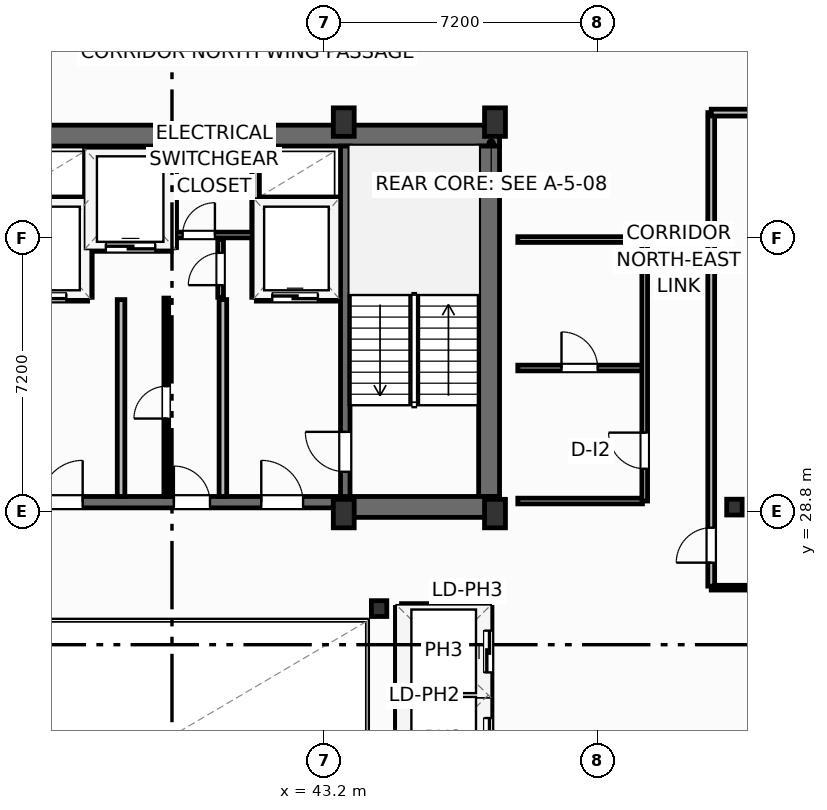
"""IFC4 building model, lengths in metres.
Left out: names, types, materials, properties, quantities, classifications, styles, units other than length and angle.
Written with IfcOpenShell. Run it as: python <this file> out.ifc"""

import sys

from ifc_helpers import new_model, si_unit, direction, frame, frame_2d, origin, origin_2d, place, context, subcontext, project, spatial, rectangle, i_section, extrude, element, fill, save


model = new_model("IFC4")
c1 = context("Model", 3, precision=1e-05, world=origin(), true_north=direction((0.0, 1.0)))
c2 = subcontext(c1, "Body", "Model", "MODEL_VIEW")
j1 = project(units=[si_unit("LENGTHUNIT", "METRE"), si_unit("PLANEANGLEUNIT", "RADIAN")], contexts=[c1])
p1 = place(None, origin())
s1 = spatial("IfcSite", under=j1, at=p1, CompositionType="ELEMENT")
p2 = place(p1, origin())
s2 = spatial("IfcBuilding", under=s1, at=p2, CompositionType="ELEMENT")
p3 = place(p2, frame((0.0, 0.0, 273.0)))
s3 = spatial("IfcBuildingStorey", under=s2, at=p3, CompositionType="ELEMENT", Elevation=273.0)
for number, where, z_axis, x_axis in (
    (1, (43.72, 28.75, 0.0), (0.0, 0.0, 1.0), (1.0, 0.0, 0.0)),
    (2, (47.7, 28.75, 0.0), (0.0, 0.0, 1.0), (1.0, 0.0, 0.0)),
    (3, (43.72, 39.05, 0.0), (0.0, 0.0, 1.0), (1.0, 0.0, 0.0)),
    (4, (47.7, 39.05, 0.0), (0.0, 0.0, 1.0), (1.0, 0.0, 0.0)),
):
    element("IfcColumn", number, at=place(p3, frame(where, z_axis=z_axis, x_axis=x_axis)), inside=s3, PredefinedType="COLUMN", context=c2, shape_type="SweptSolid", body=[
        extrude(rectangle(XDim=0.55, YDim=0.75, at=origin_2d()), origin(), (0.0, 0.0, 1.0), 3.7),
    ])
for number, where, z_axis, x_axis in (
    (5, (44.65, 26.25, 0.0), (0.0, 0.0, 1.0), (1.0, 0.0, 0.0)),
    (6, (54.0, 28.92, 0.0), (0.0, 0.0, 1.0), (1.0, 0.0, 0.0)),
):
    element("IfcColumn", number, at=place(p3, frame(where, z_axis=z_axis, x_axis=x_axis)), inside=s3, PredefinedType="COLUMN", context=c2, shape_type="SweptSolid", body=[
        extrude(i_section(OverallWidth=0.406, OverallDepth=0.416, WebThickness=0.03, FlangeThickness=0.048, FilletRadius=0.025, at=origin_2d()), origin(), (0.0, 0.0, 1.0), 3.7),
    ])
p4 = place(p3, frame((30.58, 38.695, 0.0), z_axis=(0.0, 0.0, 1.0), x_axis=(1.0, 0.0, 0.0)))
e7 = element("IfcWall", 7, at=p4, inside=s3, PredefinedType="SHEAR", context=c2, shape_type="SweptSolid", body=[
    extrude(rectangle(XDim=17.24, YDim=0.55, at=frame_2d((8.62, 0.0))), origin(), (0.0, 0.0, 1.0), 3.45),
])
p5 = place(p3, frame((47.545, 29.2, 0.0), z_axis=(0.0, 0.0, 1.0), x_axis=(0.0, 1.0, 0.0)))
e8 = element("IfcWall", 8, at=p5, inside=s3, PredefinedType="SHEAR", context=c2, shape_type="SweptSolid", body=[
    extrude(rectangle(XDim=9.22, YDim=0.55, at=frame_2d((4.61, 0.0))), origin(), (0.0, 0.0, 1.0), 3.45),
])
p6 = place(p3, frame((43.6, 28.925, 0.0), z_axis=(0.0, 0.0, 1.0), x_axis=(1.0, 0.0, 0.0)))
e9 = element("IfcWall", 9, at=p6, inside=s3, PredefinedType="SHEAR", context=c2, shape_type="SweptSolid", body=[
    extrude(rectangle(XDim=4.22, YDim=0.55, at=frame_2d((2.11, 0.0))), origin(), (0.0, 0.0, 1.0), 3.45),
])
p7 = place(p3, frame((34.8, 29.05, 0.0), z_axis=(0.0, 0.0, 1.0), x_axis=(1.0, 0.0, 0.0)))
e10 = element("IfcWall", 10, at=p7, inside=s3, PredefinedType="SHEAR", context=c2, shape_type="SweptSolid", body=[
    extrude(rectangle(XDim=8.8, YDim=0.3, at=frame_2d((4.4, 0.0))), origin(), (0.0, 0.0, 1.0), 3.45),
])
p8 = place(p7, frame((0.95, 0.0, 0.0)))
e11 = element("IfcOpeningElement", 11, at=p8, cuts=e10, PredefinedType="OPENING", context=c2, shape_type="SweptSolid", body=[
    extrude(rectangle(XDim=1.1, YDim=2.15, at=frame_2d((0.55, 1.075))), frame((0.0, 0.16, 0.0), z_axis=(0.0, -1.0, 0.0), x_axis=(1.0, 0.0, 0.0)), (0.0, 0.0, 1.0), 0.32),
])
p9 = place(p7, frame((6.75, 0.0, 0.0)))
e12 = element("IfcOpeningElement", 12, at=p9, cuts=e10, PredefinedType="OPENING", context=c2, shape_type="SweptSolid", body=[
    extrude(rectangle(XDim=1.1, YDim=2.15, at=frame_2d((0.55, 1.075))), frame((0.0, 0.16, 0.0), z_axis=(0.0, -1.0, 0.0), x_axis=(1.0, 0.0, 0.0)), (0.0, 0.0, 1.0), 0.32),
])
p10 = place(p7, frame((4.45, 0.0, 0.0)))
e13 = element("IfcOpeningElement", 13, at=p10, cuts=e10, PredefinedType="OPENING", context=c2, shape_type="SweptSolid", body=[
    extrude(rectangle(XDim=0.95, YDim=2.15, at=frame_2d((0.475, 1.075))), frame((0.0, 0.16, 0.0), z_axis=(0.0, -1.0, 0.0), x_axis=(1.0, 0.0, 0.0)), (0.0, 0.0, 1.0), 0.32),
])
p11 = place(p3, frame((43.76, 29.2, 0.0), z_axis=(0.0, 0.0, 1.0), x_axis=(0.0, 1.0, 0.0)))
e14 = element("IfcWall", 14, at=p11, inside=s3, PredefinedType="SHEAR", context=c2, shape_type="SweptSolid", body=[
    extrude(rectangle(XDim=9.22, YDim=0.25, at=frame_2d((4.61, 0.0))), origin(), (0.0, 0.0, 1.0), 3.45),
])
p12 = place(p11, frame((0.65, 0.0, 0.0)))
e15 = element("IfcOpeningElement", 15, at=p12, cuts=e14, PredefinedType="OPENING", context=c2, shape_type="SweptSolid", body=[
    extrude(rectangle(XDim=1.05, YDim=2.15, at=frame_2d((0.525, 1.075))), frame((0.0, 0.135, 0.0), z_axis=(0.0, -1.0, 0.0), x_axis=(1.0, 0.0, 0.0)), (0.0, 0.0, 1.0), 0.27),
])
p13 = place(p3, frame((53.39, 26.8, 0.0), z_axis=(0.0, 0.0, 1.0), x_axis=(1.0, 0.0, 0.0)))
e16 = element("IfcWall", 16, at=p13, inside=s3, PredefinedType="PARTITIONING", context=c2, shape_type="SweptSolid", body=[
    extrude(rectangle(XDim=22.348, YDim=0.125, at=frame_2d((11.174, 0.0))), origin(), (0.0, 0.0, 1.0), 3.45),
])
p14 = place(p3, frame((53.39, 26.84, 0.0), z_axis=(0.0, 0.0, 1.0), x_axis=(0.0, 1.0, 0.0)))
e17 = element("IfcWall", 17, at=p14, inside=s3, PredefinedType="PARTITIONING", context=c2, shape_type="SweptSolid", body=[
    extrude(rectangle(XDim=12.46, YDim=0.18, at=frame_2d((6.23, 0.0))), origin(), (0.0, 0.0, 1.0), 3.45),
])
p15 = place(p14, frame((0.618, 0.0, 0.0)))
e18 = element("IfcOpeningElement", 18, at=p15, cuts=e17, PredefinedType="OPENING", context=c2, shape_type="SweptSolid", body=[
    extrude(rectangle(XDim=0.92, YDim=2.05, at=frame_2d((0.46, 1.025))), frame((0.0, 0.1, 0.0), z_axis=(0.0, -1.0, 0.0), x_axis=(1.0, 0.0, 0.0)), (0.0, 0.0, 1.0), 0.2),
])
p16 = place(p3, frame((53.39, 39.3, 0.0), z_axis=(0.0, 0.0, 1.0), x_axis=(1.0, 0.0, 0.0)))
e19 = element("IfcWall", 19, at=p16, inside=s3, PredefinedType="PARTITIONING", context=c2, shape_type="SweptSolid", body=[
    extrude(rectangle(XDim=16.149, YDim=0.18, at=frame_2d((8.075, 0.0))), origin(), (0.0, 0.0, 1.0), 2.739),
])
for number, where, z_axis, x_axis in (
    (20, (37.86, 29.2, 0.0), (0.0, 0.0, 1.0), (0.0, 1.0, 0.0)),
    (21, (40.54, 29.2, 0.0), (0.0, 0.0, 1.0), (0.0, 1.0, 0.0)),
):
    element("IfcWall", number, at=place(p3, frame(where, z_axis=z_axis, x_axis=x_axis)), inside=s3, PredefinedType="PARTITIONING", context=c2, shape_type="SweptSolid", body=[
        extrude(rectangle(XDim=5.18, YDim=0.2, at=frame_2d((2.59, 0.0))), origin(), (0.0, 0.0, 1.0), 3.45),
    ])
p17 = place(p3, frame((34.8, 34.44, 0.0), z_axis=(0.0, 0.0, 1.0), x_axis=(1.0, 0.0, 0.0)))
e22 = element("IfcWall", 22, at=p17, inside=s3, PredefinedType="PARTITIONING", context=c2, shape_type="SweptSolid", body=[
    extrude(rectangle(XDim=2.18, YDim=0.2, at=frame_2d((1.09, 0.0))), origin(), (0.0, 0.0, 1.0), 3.45),
])
p18 = place(p17, frame((0.42, 0.0, 0.0)))
e23 = element("IfcOpeningElement", 23, at=p18, cuts=e22, PredefinedType="OPENING", context=c2, shape_type="SweptSolid", body=[
    extrude(rectangle(XDim=1.2, YDim=2.2, at=frame_2d((0.6, 1.1))), frame((0.0, 0.11, 0.0), z_axis=(0.0, -1.0, 0.0), x_axis=(1.0, 0.0, 0.0)), (0.0, 0.0, 1.0), 0.22),
])
p19 = place(p3, frame((34.8, 36.98, 0.0), z_axis=(0.0, 0.0, 1.0), x_axis=(1.0, 0.0, 0.0)))
e24 = element("IfcWall", 24, at=p19, inside=s3, PredefinedType="PARTITIONING", context=c2, shape_type="SweptSolid", body=[
    extrude(rectangle(XDim=2.18, YDim=0.2, at=frame_2d((1.09, 0.0))), origin(), (0.0, 0.0, 1.0), 3.45),
])
p20 = place(p3, frame((37.0, 34.44, 0.0), z_axis=(0.0, 0.0, 1.0), x_axis=(0.0, 1.0, 0.0)))
e25 = element("IfcWall", 25, at=p20, inside=s3, PredefinedType="PARTITIONING", context=c2, shape_type="SweptSolid", body=[
    extrude(rectangle(XDim=3.9, YDim=0.2, at=frame_2d((1.95, 0.0))), origin(), (0.0, 0.0, 1.0), 3.45),
])
p21 = place(p3, frame((41.42, 34.44, 0.0), z_axis=(0.0, 0.0, 1.0), x_axis=(1.0, 0.0, 0.0)))
e26 = element("IfcWall", 26, at=p21, inside=s3, PredefinedType="PARTITIONING", context=c2, shape_type="SweptSolid", body=[
    extrude(rectangle(XDim=2.18, YDim=0.2, at=frame_2d((1.09, 0.0))), origin(), (0.0, 0.0, 1.0), 3.45),
])
p22 = place(p21, frame((0.42, 0.0, 0.0)))
e27 = element("IfcOpeningElement", 27, at=p22, cuts=e26, PredefinedType="OPENING", context=c2, shape_type="SweptSolid", body=[
    extrude(rectangle(XDim=1.2, YDim=2.2, at=frame_2d((0.6, 1.1))), frame((0.0, 0.11, 0.0), z_axis=(0.0, -1.0, 0.0), x_axis=(1.0, 0.0, 0.0)), (0.0, 0.0, 1.0), 0.22),
])
p23 = place(p3, frame((41.42, 36.98, 0.0), z_axis=(0.0, 0.0, 1.0), x_axis=(1.0, 0.0, 0.0)))
e28 = element("IfcWall", 28, at=p23, inside=s3, PredefinedType="PARTITIONING", context=c2, shape_type="SweptSolid", body=[
    extrude(rectangle(XDim=2.18, YDim=0.2, at=frame_2d((1.09, 0.0))), origin(), (0.0, 0.0, 1.0), 3.45),
])
p24 = place(p3, frame((41.4, 34.44, 0.0), z_axis=(0.0, 0.0, 1.0), x_axis=(0.0, 1.0, 0.0)))
e29 = element("IfcWall", 29, at=p24, inside=s3, PredefinedType="PARTITIONING", context=c2, shape_type="SweptSolid", body=[
    extrude(rectangle(XDim=3.9, YDim=0.2, at=frame_2d((1.95, 0.0))), origin(), (0.0, 0.0, 1.0), 3.45),
])
p25 = place(p3, frame((37.06, 35.75, 0.0), z_axis=(0.0, 0.0, 1.0), x_axis=(1.0, 0.0, 0.0)))
e30 = element("IfcWall", 30, at=p25, inside=s3, PredefinedType="PARTITIONING", context=c2, shape_type="SweptSolid", body=[
    extrude(rectangle(XDim=2.12, YDim=0.2, at=frame_2d((1.06, 0.0))), origin(), (0.0, 0.0, 1.0), 3.45),
])
p26 = place(p25, frame((0.4, 0.0, 0.0)))
e31 = element("IfcOpeningElement", 31, at=p26, cuts=e30, PredefinedType="OPENING", context=c2, shape_type="SweptSolid", body=[
    extrude(rectangle(XDim=1.3, YDim=2.2, at=frame_2d((0.65, 1.1))), frame((0.0, 0.11, 0.0), z_axis=(0.0, -1.0, 0.0), x_axis=(1.0, 0.0, 0.0)), (0.0, 0.0, 1.0), 0.22),
])
p27 = place(p3, frame((39.22, 35.75, 0.0), z_axis=(0.0, 0.0, 1.0), x_axis=(0.0, 1.0, 0.0)))
e32 = element("IfcWall", 32, at=p27, inside=s3, PredefinedType="PARTITIONING", context=c2, shape_type="SweptSolid", body=[
    extrude(rectangle(XDim=2.59, YDim=0.2, at=frame_2d((1.295, 0.0))), origin(), (0.0, 0.0, 1.0), 3.45),
])
p28 = place(p3, frame((39.3, 36.08, 0.0), z_axis=(0.0, 0.0, 1.0), x_axis=(1.0, 0.0, 0.0)))
e33 = element("IfcWall", 33, at=p28, inside=s3, PredefinedType="PARTITIONING", context=c2, shape_type="SweptSolid", body=[
    extrude(rectangle(XDim=2.02, YDim=0.15, at=frame_2d((1.01, 0.0))), origin(), (0.0, 0.0, 1.0), 3.45),
])
p29 = place(p28, frame((0.18, 0.0, 0.0)))
e34 = element("IfcOpeningElement", 34, at=p29, cuts=e33, PredefinedType="OPENING", context=c2, shape_type="SweptSolid", body=[
    extrude(rectangle(XDim=0.85, YDim=2.05, at=frame_2d((0.425, 1.025))), frame((0.0, 0.085, 0.0), z_axis=(0.0, -1.0, 0.0), x_axis=(1.0, 0.0, 0.0)), (0.0, 0.0, 1.0), 0.17),
])
p30 = place(p3, frame((40.48, 34.44, 0.0), z_axis=(0.0, 0.0, 1.0), x_axis=(0.0, 1.0, 0.0)))
e35 = element("IfcWall", 35, at=p30, inside=s3, PredefinedType="PARTITIONING", context=c2, shape_type="SweptSolid", body=[
    extrude(rectangle(XDim=1.52, YDim=0.15, at=frame_2d((0.76, 0.0))), origin(), (0.0, 0.0, 1.0), 3.45),
])
p31 = place(p30, frame((0.32, 0.0, 0.0)))
e36 = element("IfcOpeningElement", 36, at=p31, cuts=e35, PredefinedType="OPENING", context=c2, shape_type="SweptSolid", body=[
    extrude(rectangle(XDim=0.85, YDim=2.05, at=frame_2d((0.425, 1.025))), frame((0.0, 0.085, 0.0), z_axis=(0.0, -1.0, 0.0), x_axis=(1.0, 0.0, 0.0)), (0.0, 0.0, 1.0), 0.17),
])
p32 = place(p3, frame((39.05, 29.2, 0.0), z_axis=(0.0, 0.0, 1.0), x_axis=(0.0, 1.0, 0.0)))
e37 = element("IfcWall", 37, at=p32, inside=s3, PredefinedType="PARTITIONING", context=c2, shape_type="SweptSolid", body=[
    extrude(rectangle(XDim=5.22, YDim=0.125, at=frame_2d((2.61, 0.0))), origin(), (0.0, 0.0, 1.0), 3.45),
])
p33 = place(p32, frame((2.05, 0.0, 0.0)))
e38 = element("IfcOpeningElement", 38, at=p33, cuts=e37, PredefinedType="OPENING", context=c2, shape_type="SweptSolid", body=[
    extrude(rectangle(XDim=0.85, YDim=2.05, at=frame_2d((0.425, 1.025))), frame((0.0, 0.073, 0.0), z_axis=(0.0, -1.0, 0.0), x_axis=(1.0, 0.0, 0.0)), (0.0, 0.0, 1.0), 0.145),
])
p34 = place(p3, frame((48.3, 32.58, 0.0), z_axis=(0.0, 0.0, 1.0), x_axis=(1.0, 0.0, 0.0)))
e39 = element("IfcWall", 39, at=p34, inside=s3, PredefinedType="PARTITIONING", context=c2, shape_type="SweptSolid", body=[
    extrude(rectangle(XDim=3.28, YDim=0.15, at=frame_2d((1.64, 0.0))), origin(), (0.0, 0.0, 1.0), 3.45),
])
p35 = place(p34, frame((1.15, 0.0, 0.0)))
e40 = element("IfcOpeningElement", 40, at=p35, cuts=e39, PredefinedType="OPENING", context=c2, shape_type="SweptSolid", body=[
    extrude(rectangle(XDim=0.95, YDim=2.05, at=frame_2d((0.475, 1.025))), frame((0.0, 0.085, 0.0), z_axis=(0.0, -1.0, 0.0), x_axis=(1.0, 0.0, 0.0)), (0.0, 0.0, 1.0), 0.17),
])
p36 = place(p3, frame((48.3, 29.08, 0.0), z_axis=(0.0, 0.0, 1.0), x_axis=(1.0, 0.0, 0.0)))
e41 = element("IfcWall", 41, at=p36, inside=s3, PredefinedType="PARTITIONING", context=c2, shape_type="SweptSolid", body=[
    extrude(rectangle(XDim=3.28, YDim=0.15, at=frame_2d((1.64, 0.0))), origin(), (0.0, 0.0, 1.0), 2.662),
])
p37 = place(p3, frame((48.3, 35.96, 0.0), z_axis=(0.0, 0.0, 1.0), x_axis=(1.0, 0.0, 0.0)))
e42 = element("IfcWall", 42, at=p37, inside=s3, PredefinedType="PARTITIONING", context=c2, shape_type="SweptSolid", body=[
    extrude(rectangle(XDim=3.28, YDim=0.15, at=frame_2d((1.64, 0.0))), origin(), (0.0, 0.0, 1.0), 3.45),
])
p38 = place(p3, frame((51.64, 29.08, 0.0), z_axis=(0.0, 0.0, 1.0), x_axis=(0.0, 1.0, 0.0)))
e43 = element("IfcWall", 43, at=p38, inside=s3, PredefinedType="PARTITIONING", context=c2, shape_type="SweptSolid", body=[
    extrude(rectangle(XDim=6.88, YDim=0.15, at=frame_2d((3.44, 0.0))), origin(), (0.0, 0.0, 1.0), 3.45),
])
p39 = place(p38, frame((0.85, 0.0, 0.0)))
e44 = element("IfcOpeningElement", 44, at=p39, cuts=e43, PredefinedType="OPENING", context=c2, shape_type="SweptSolid", body=[
    extrude(rectangle(XDim=0.95, YDim=2.05, at=frame_2d((0.475, 1.025))), frame((0.0, 0.085, 0.0), z_axis=(0.0, -1.0, 0.0), x_axis=(1.0, 0.0, 0.0)), (0.0, 0.0, 1.0), 0.17),
])
for number, where, z_axis, x_axis in (
    (45, (45.24, 23.975, 0.0), (0.0, 0.0, 1.0), (1.0, 0.0, 0.0)),
    (46, (45.24, 26.28, 0.0), (0.0, 0.0, 1.0), (1.0, 0.0, 0.0)),
):
    element("IfcWall", number, at=place(p3, frame(where, z_axis=z_axis, x_axis=x_axis)), inside=s3, PredefinedType="PARTITIONING", context=c2, shape_type="SweptSolid", body=[
        extrude(rectangle(XDim=2.22, YDim=0.2, at=frame_2d((1.11, 0.0))), origin(), (0.0, 0.0, 1.0), 3.45),
    ])
p40 = place(p3, frame((45.18, 19.38, 0.0), z_axis=(0.0, 0.0, 1.0), x_axis=(0.0, 1.0, 0.0)))
e47 = element("IfcWall", 47, at=p40, inside=s3, PredefinedType="PARTITIONING", context=c2, shape_type="SweptSolid", body=[
    extrude(rectangle(XDim=6.9, YDim=0.2, at=frame_2d((3.45, 0.0))), origin(), (0.0, 0.0, 1.0), 3.45),
])
p41 = place(p3, frame((47.52, 19.38, 0.0), z_axis=(0.0, 0.0, 1.0), x_axis=(0.0, 1.0, 0.0)))
e48 = element("IfcWall", 48, at=p41, inside=s3, PredefinedType="PARTITIONING", context=c2, shape_type="SweptSolid", body=[
    extrude(rectangle(XDim=6.9, YDim=0.2, at=frame_2d((3.45, 0.0))), origin(), (0.0, 0.0, 1.0), 3.45),
])
p42 = place(p41, frame((0.59, 0.0, 0.0)))
e49 = element("IfcOpeningElement", 49, at=p42, cuts=e48, PredefinedType="OPENING", context=c2, shape_type="SweptSolid", body=[
    extrude(rectangle(XDim=1.1, YDim=2.15, at=frame_2d((0.55, 1.075))), frame((0.0, 0.11, 0.0), z_axis=(0.0, -1.0, 0.0), x_axis=(1.0, 0.0, 0.0)), (0.0, 0.0, 1.0), 0.22),
])
p43 = place(p41, frame((2.89, 0.0, 0.0)))
e50 = element("IfcOpeningElement", 50, at=p43, cuts=e48, PredefinedType="OPENING", context=c2, shape_type="SweptSolid", body=[
    extrude(rectangle(XDim=1.1, YDim=2.15, at=frame_2d((0.55, 1.075))), frame((0.0, 0.11, 0.0), z_axis=(0.0, -1.0, 0.0), x_axis=(1.0, 0.0, 0.0)), (0.0, 0.0, 1.0), 0.22),
])
p44 = place(p41, frame((5.19, 0.0, 0.0)))
e51 = element("IfcOpeningElement", 51, at=p44, cuts=e48, PredefinedType="OPENING", context=c2, shape_type="SweptSolid", body=[
    extrude(rectangle(XDim=1.1, YDim=2.15, at=frame_2d((0.55, 1.075))), frame((0.0, 0.11, 0.0), z_axis=(0.0, -1.0, 0.0), x_axis=(1.0, 0.0, 0.0)), (0.0, 0.0, 1.0), 0.22),
])
p45 = place(p15, origin())
e52 = element("IfcDoor", 52, at=p45, inside=s3, OperationType="SINGLE_SWING_LEFT", PredefinedType="DOOR", context=c2, shape_type="SweptSolid", body=[
    extrude(rectangle(XDim=0.92, YDim=2.05, at=frame_2d((0.46, 1.025))), frame((0.0, 0.025, 0.0), z_axis=(0.0, -1.0, 0.0), x_axis=(1.0, 0.0, 0.0)), (0.0, 0.0, 1.0), 0.05),
])
fill(e18, e52)
p46 = place(p12, origin())
e53 = element("IfcDoor", 53, at=p46, inside=s3, OperationType="SINGLE_SWING_RIGHT", PredefinedType="DOOR", context=c2, shape_type="SweptSolid", body=[
    extrude(rectangle(XDim=1.05, YDim=2.15, at=frame_2d((0.525, 1.075))), frame((0.0, 0.025, 0.0), z_axis=(0.0, -1.0, 0.0), x_axis=(1.0, 0.0, 0.0)), (0.0, 0.0, 1.0), 0.05),
])
fill(e15, e53)
p47 = place(p8, origin())
e54 = element("IfcDoor", 54, at=p47, inside=s3, OperationType="SINGLE_SWING_RIGHT", PredefinedType="DOOR", context=c2, shape_type="SweptSolid", body=[
    extrude(rectangle(XDim=1.1, YDim=2.15, at=frame_2d((0.55, 1.075))), frame((0.0, 0.025, 0.0), z_axis=(0.0, -1.0, 0.0), x_axis=(1.0, 0.0, 0.0)), (0.0, 0.0, 1.0), 0.05),
])
fill(e11, e54)
p48 = place(p9, origin())
e55 = element("IfcDoor", 55, at=p48, inside=s3, OperationType="SINGLE_SWING_LEFT", PredefinedType="DOOR", context=c2, shape_type="SweptSolid", body=[
    extrude(rectangle(XDim=1.1, YDim=2.15, at=frame_2d((0.55, 1.075))), frame((0.0, 0.025, 0.0), z_axis=(0.0, -1.0, 0.0), x_axis=(1.0, 0.0, 0.0)), (0.0, 0.0, 1.0), 0.05),
])
fill(e12, e55)
p49 = place(p18, origin())
e56 = element("IfcDoor", 56, at=p49, inside=s3, OperationType="SLIDING_TO_LEFT", PredefinedType="DOOR", context=c2, shape_type="SweptSolid", body=[
    extrude(rectangle(XDim=1.2, YDim=2.2, at=frame_2d((0.6, 1.1))), frame((0.0, 0.025, 0.0), z_axis=(0.0, -1.0, 0.0), x_axis=(1.0, 0.0, 0.0)), (0.0, 0.0, 1.0), 0.05),
])
fill(e23, e56)
p50 = place(p22, origin())
e57 = element("IfcDoor", 57, at=p50, inside=s3, OperationType="SLIDING_TO_LEFT", PredefinedType="DOOR", context=c2, shape_type="SweptSolid", body=[
    extrude(rectangle(XDim=1.2, YDim=2.2, at=frame_2d((0.6, 1.1))), frame((0.0, 0.025, 0.0), z_axis=(0.0, -1.0, 0.0), x_axis=(1.0, 0.0, 0.0)), (0.0, 0.0, 1.0), 0.05),
])
fill(e27, e57)
p51 = place(p26, origin())
e58 = element("IfcDoor", 58, at=p51, inside=s3, OperationType="SLIDING_TO_LEFT", PredefinedType="DOOR", context=c2, shape_type="SweptSolid", body=[
    extrude(rectangle(XDim=1.3, YDim=2.2, at=frame_2d((0.65, 1.1))), frame((0.0, 0.025, 0.0), z_axis=(0.0, -1.0, 0.0), x_axis=(1.0, 0.0, 0.0)), (0.0, 0.0, 1.0), 0.05),
])
fill(e31, e58)
p52 = place(p29, origin())
e59 = element("IfcDoor", 59, at=p52, inside=s3, OperationType="SINGLE_SWING_RIGHT", PredefinedType="DOOR", context=c2, shape_type="SweptSolid", body=[
    extrude(rectangle(XDim=0.85, YDim=2.05, at=frame_2d((0.425, 1.025))), frame((0.0, 0.025, 0.0), z_axis=(0.0, -1.0, 0.0), x_axis=(1.0, 0.0, 0.0)), (0.0, 0.0, 1.0), 0.05),
])
fill(e34, e59)
p53 = place(p31, origin())
e60 = element("IfcDoor", 60, at=p53, inside=s3, OperationType="SINGLE_SWING_LEFT", PredefinedType="DOOR", context=c2, shape_type="SweptSolid", body=[
    extrude(rectangle(XDim=0.85, YDim=2.05, at=frame_2d((0.425, 1.025))), frame((0.0, 0.025, 0.0), z_axis=(0.0, -1.0, 0.0), x_axis=(1.0, 0.0, 0.0)), (0.0, 0.0, 1.0), 0.05),
])
fill(e36, e60)
p54 = place(p33, origin())
e61 = element("IfcDoor", 61, at=p54, inside=s3, OperationType="SINGLE_SWING_LEFT", PredefinedType="DOOR", context=c2, shape_type="SweptSolid", body=[
    extrude(rectangle(XDim=0.85, YDim=2.05, at=frame_2d((0.425, 1.025))), frame((0.0, 0.025, 0.0), z_axis=(0.0, -1.0, 0.0), x_axis=(1.0, 0.0, 0.0)), (0.0, 0.0, 1.0), 0.05),
])
fill(e38, e61)
p55 = place(p10, origin())
e62 = element("IfcDoor", 62, at=p55, inside=s3, OperationType="SINGLE_SWING_LEFT", PredefinedType="DOOR", context=c2, shape_type="SweptSolid", body=[
    extrude(rectangle(XDim=0.95, YDim=2.15, at=frame_2d((0.475, 1.075))), frame((0.0, 0.025, 0.0), z_axis=(0.0, -1.0, 0.0), x_axis=(1.0, 0.0, 0.0)), (0.0, 0.0, 1.0), 0.05),
])
fill(e13, e62)
p56 = place(p35, origin())
e63 = element("IfcDoor", 63, at=p56, inside=s3, OperationType="SINGLE_SWING_LEFT", PredefinedType="DOOR", context=c2, shape_type="SweptSolid", body=[
    extrude(rectangle(XDim=0.95, YDim=2.05, at=frame_2d((0.475, 1.025))), frame((0.0, 0.025, 0.0), z_axis=(0.0, -1.0, 0.0), x_axis=(1.0, 0.0, 0.0)), (0.0, 0.0, 1.0), 0.05),
])
fill(e40, e63)
p57 = place(p39, origin())
e64 = element("IfcDoor", 64, at=p57, inside=s3, OperationType="SINGLE_SWING_RIGHT", PredefinedType="DOOR", context=c2, shape_type="SweptSolid", body=[
    extrude(rectangle(XDim=0.95, YDim=2.05, at=frame_2d((0.475, 1.025))), frame((0.0, 0.025, 0.0), z_axis=(0.0, -1.0, 0.0), x_axis=(1.0, 0.0, 0.0)), (0.0, 0.0, 1.0), 0.05),
])
fill(e44, e64)
p58 = place(p43, origin())
e65 = element("IfcDoor", 65, at=p58, inside=s3, OperationType="SLIDING_TO_LEFT", PredefinedType="DOOR", context=c2, shape_type="SweptSolid", body=[
    extrude(rectangle(XDim=1.1, YDim=2.15, at=frame_2d((0.55, 1.075))), frame((0.0, 0.025, 0.0), z_axis=(0.0, -1.0, 0.0), x_axis=(1.0, 0.0, 0.0)), (0.0, 0.0, 1.0), 0.05),
])
fill(e50, e65)
p59 = place(p44, origin())
e66 = element("IfcDoor", 66, at=p59, inside=s3, OperationType="SLIDING_TO_LEFT", PredefinedType="DOOR", context=c2, shape_type="SweptSolid", body=[
    extrude(rectangle(XDim=1.1, YDim=2.15, at=frame_2d((0.55, 1.075))), frame((0.0, 0.025, 0.0), z_axis=(0.0, -1.0, 0.0), x_axis=(1.0, 0.0, 0.0)), (0.0, 0.0, 1.0), 0.05),
])
fill(e51, e66)
save(model, sys.argv[1])
